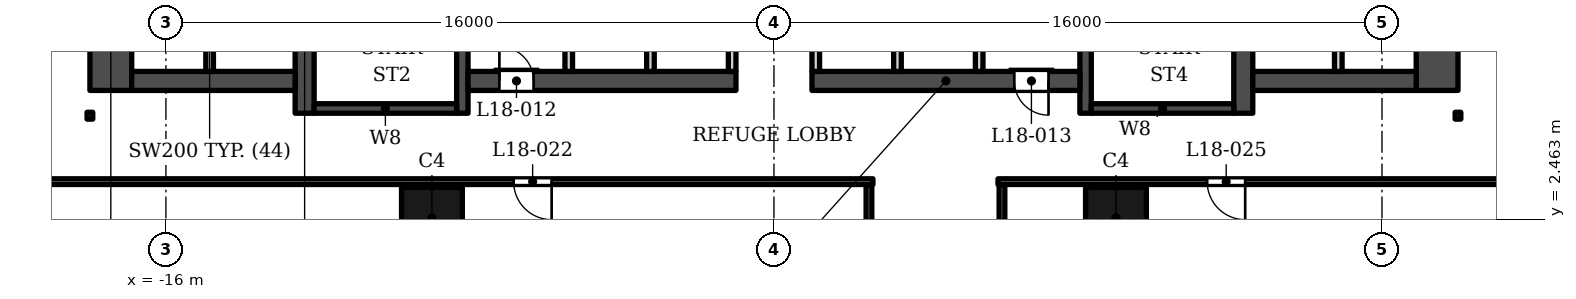
"""IFC4 building model, lengths in metres.
Left out: names, types, materials, properties, quantities, classifications, styles, units other than length and angle.
Written with IfcOpenShell. Run it as: python <this file> out.ifc"""

import sys

from ifc_helpers import new_model, si_unit, direction, frame, frame_2d, origin, origin_2d, place, context, subcontext, project, spatial, rectangle, extrude, element, fill, save


model = new_model("IFC4")
c1 = context("Model", 3, precision=1e-05, world=origin(), true_north=direction((0.0, 1.0)))
c2 = subcontext(c1, "Body", "Model", "MODEL_VIEW")
j1 = project(units=[si_unit("LENGTHUNIT", "METRE"), si_unit("PLANEANGLEUNIT", "RADIAN")], contexts=[c1])
p1 = place(None, origin())
s1 = spatial("IfcSite", under=j1, at=p1, CompositionType="ELEMENT")
p2 = place(p1, origin())
s2 = spatial("IfcBuilding", under=s1, at=p2, CompositionType="ELEMENT")
p3 = place(p2, frame((0.0, 0.0, 86.8)))
s3 = spatial("IfcBuildingStorey", under=s2, at=p3, CompositionType="ELEMENT", Elevation=86.8)
p4 = place(p3, frame((-12.35, 5.253, 0.0), z_axis=(0.0, 0.0, 1.0), x_axis=(0.0, 1.0, 0.0)))
e1 = element("IfcWall", 1, at=p4, inside=s3, PredefinedType="SHEAR", context=c2, shape_type="SweptSolid", body=[
    extrude(rectangle(XDim=13.3, YDim=0.5, at=frame_2d((6.65, 0.0))), origin(), (0.0, 0.0, 1.0), 5.0),
])
p5 = place(p3, frame((-8.2, 5.253, 0.0), z_axis=(0.0, 0.0, 1.0), x_axis=(0.0, 1.0, 0.0)))
e2 = element("IfcWall", 2, at=p5, inside=s3, PredefinedType="SHEAR", context=c2, shape_type="SweptSolid", body=[
    extrude(rectangle(XDim=13.3, YDim=0.3, at=frame_2d((6.65, 0.0))), origin(), (0.0, 0.0, 1.0), 5.0),
])
p6 = place(p5, frame((7.1, 0.0, 0.0)))
e3 = element("IfcOpeningElement", 3, at=p6, cuts=e2, PredefinedType="OPENING", context=c2, shape_type="SweptSolid", body=[
    extrude(rectangle(XDim=1.4, YDim=2.1, at=frame_2d((0.7, 1.05))), frame((0.0, 0.16, 0.0), z_axis=(0.0, -1.0, 0.0), x_axis=(1.0, 0.0, 0.0)), (0.0, 0.0, 1.0), 0.32),
])
p7 = place(p5, frame((5.05, 0.0, 0.0)))
e4 = element("IfcOpeningElement", 4, at=p7, cuts=e2, PredefinedType="OPENING", context=c2, shape_type="SweptSolid", body=[
    extrude(rectangle(XDim=1.4, YDim=2.1, at=frame_2d((0.7, 1.05))), frame((0.0, 0.16, 0.0), z_axis=(0.0, -1.0, 0.0), x_axis=(1.0, 0.0, 0.0)), (0.0, 0.0, 1.0), 0.32),
])
p8 = place(p3, frame((-12.1, 5.378, 0.0), z_axis=(0.0, 0.0, 1.0), x_axis=(1.0, 0.0, 0.0)))
e5 = element("IfcWall", 5, at=p8, inside=s3, PredefinedType="SHEAR", context=c2, shape_type="SweptSolid", body=[
    extrude(rectangle(XDim=3.75, YDim=0.25, at=frame_2d((1.875, 0.0))), origin(), (0.0, 0.0, 1.0), 5.0),
])
p9 = place(p3, frame((12.35, 5.253, 0.0), z_axis=(0.0, 0.0, 1.0), x_axis=(0.0, 1.0, 0.0)))
e6 = element("IfcWall", 6, at=p9, inside=s3, PredefinedType="SHEAR", context=c2, shape_type="SweptSolid", body=[
    extrude(rectangle(XDim=13.3, YDim=0.5, at=frame_2d((6.65, 0.0))), origin(), (0.0, 0.0, 1.0), 5.0),
])
p10 = place(p3, frame((8.2, 5.253, 0.0), z_axis=(0.0, 0.0, 1.0), x_axis=(0.0, 1.0, 0.0)))
e7 = element("IfcWall", 7, at=p10, inside=s3, PredefinedType="SHEAR", context=c2, shape_type="SweptSolid", body=[
    extrude(rectangle(XDim=13.3, YDim=0.3, at=frame_2d((6.65, 0.0))), origin(), (0.0, 0.0, 1.0), 5.0),
])
p11 = place(p10, frame((7.1, 0.0, 0.0)))
e8 = element("IfcOpeningElement", 8, at=p11, cuts=e7, PredefinedType="OPENING", context=c2, shape_type="SweptSolid", body=[
    extrude(rectangle(XDim=1.4, YDim=2.1, at=frame_2d((0.7, 1.05))), frame((0.0, 0.16, 0.0), z_axis=(0.0, -1.0, 0.0), x_axis=(1.0, 0.0, 0.0)), (0.0, 0.0, 1.0), 0.32),
])
p12 = place(p10, frame((5.05, 0.0, 0.0)))
e9 = element("IfcOpeningElement", 9, at=p12, cuts=e7, PredefinedType="OPENING", context=c2, shape_type="SweptSolid", body=[
    extrude(rectangle(XDim=1.4, YDim=2.1, at=frame_2d((0.7, 1.05))), frame((0.0, 0.16, 0.0), z_axis=(0.0, -1.0, 0.0), x_axis=(1.0, 0.0, 0.0)), (0.0, 0.0, 1.0), 0.32),
])
p13 = place(p3, frame((8.35, 5.378, 0.0), z_axis=(0.0, 0.0, 1.0), x_axis=(1.0, 0.0, 0.0)))
e10 = element("IfcWall", 10, at=p13, inside=s3, PredefinedType="SHEAR", context=c2, shape_type="SweptSolid", body=[
    extrude(rectangle(XDim=3.75, YDim=0.25, at=frame_2d((1.875, 0.0))), origin(), (0.0, 0.0, 1.0), 5.0),
])
p14 = place(p3, frame((-8.05, 6.103, 0.0), z_axis=(0.0, 0.0, 1.0), x_axis=(1.0, 0.0, 0.0)))
e11 = element("IfcWall", 11, at=p14, inside=s3, PredefinedType="SHEAR", context=c2, shape_type="SweptSolid", body=[
    extrude(rectangle(XDim=7.05, YDim=0.5, at=frame_2d((3.525, 0.0))), origin(), (0.0, 0.0, 1.0), 5.0),
])
p15 = place(p14, frame((0.825, 0.0, 0.0)))
e12 = element("IfcOpeningElement", 12, at=p15, cuts=e11, PredefinedType="OPENING", context=c2, shape_type="SweptSolid", body=[
    extrude(rectangle(XDim=0.9, YDim=2.1, at=frame_2d((0.45, 1.05))), frame((0.0, 0.26, 0.0), z_axis=(0.0, -1.0, 0.0), x_axis=(1.0, 0.0, 0.0)), (0.0, 0.0, 1.0), 0.52),
])
p16 = place(p3, frame((1.0, 6.103, 0.0), z_axis=(0.0, 0.0, 1.0), x_axis=(1.0, 0.0, 0.0)))
e13 = element("IfcWall", 13, at=p16, inside=s3, PredefinedType="SHEAR", context=c2, shape_type="SweptSolid", body=[
    extrude(rectangle(XDim=7.05, YDim=0.5, at=frame_2d((3.525, 0.0))), origin(), (0.0, 0.0, 1.0), 5.0),
])
p17 = place(p16, frame((5.325, 0.0, 0.0)))
e14 = element("IfcOpeningElement", 14, at=p17, cuts=e13, PredefinedType="OPENING", context=c2, shape_type="SweptSolid", body=[
    extrude(rectangle(XDim=0.9, YDim=2.1, at=frame_2d((0.45, 1.05))), frame((0.0, 0.26, 0.0), z_axis=(0.0, -1.0, 0.0), x_axis=(1.0, 0.0, 0.0)), (0.0, 0.0, 1.0), 0.52),
])
for number, where, z_axis, x_axis in (
    (15, (-12.6, 6.103, 0.0), (0.0, 0.0, 1.0), (-1.0, 0.0, 0.0)),
    (16, (12.6, 6.103, 0.0), (0.0, 0.0, 1.0), (1.0, 0.0, 0.0)),
):
    element("IfcWall", number, at=place(p3, frame(where, z_axis=z_axis, x_axis=x_axis)), inside=s3, PredefinedType="SHEAR", context=c2, shape_type="SweptSolid", body=[
        extrude(rectangle(XDim=4.3, YDim=0.5, at=frame_2d((2.15, 0.0))), origin(), (0.0, 0.0, 1.0), 5.0),
    ])
p18 = place(p3, frame((-17.45, 5.853, 0.0), z_axis=(0.0, 0.0, 1.0), x_axis=(0.0, 1.0, 0.0)))
e17 = element("IfcWall", 17, at=p18, inside=s3, PredefinedType="SHEAR", context=c2, shape_type="SweptSolid", body=[
    extrude(rectangle(XDim=13.2, YDim=1.1, at=frame_2d((6.6, 0.0))), origin(), (0.0, 0.0, 1.0), 5.0),
])
p19 = place(p18, frame((4.1, 0.0, 0.0)))
e18 = element("IfcOpeningElement", 18, at=p19, cuts=e17, PredefinedType="OPENING", context=c2, shape_type="SweptSolid", body=[
    extrude(rectangle(XDim=1.6, YDim=2.1, at=frame_2d((0.8, 1.05))), frame((0.0, 0.56, 0.0), z_axis=(0.0, -1.0, 0.0), x_axis=(1.0, 0.0, 0.0)), (0.0, 0.0, 1.0), 1.12),
])
p20 = place(p18, frame((11.397, 0.0, 0.0)))
e19 = element("IfcOpeningElement", 19, at=p20, cuts=e17, PredefinedType="OPENING", context=c2, shape_type="SweptSolid", body=[
    extrude(rectangle(XDim=0.9, YDim=2.1, at=frame_2d((0.45, 1.05))), frame((0.0, 0.56, 0.0), z_axis=(0.0, -1.0, 0.0), x_axis=(1.0, 0.0, 0.0)), (0.0, 0.0, 1.0), 1.12),
])
p21 = place(p3, frame((17.45, 5.853, 0.0), z_axis=(0.0, 0.0, 1.0), x_axis=(0.0, 1.0, 0.0)))
e20 = element("IfcWall", 20, at=p21, inside=s3, PredefinedType="SHEAR", context=c2, shape_type="SweptSolid", body=[
    extrude(rectangle(XDim=13.2, YDim=1.1, at=frame_2d((6.6, 0.0))), origin(), (0.0, 0.0, 1.0), 5.0),
])
p22 = place(p21, frame((4.1, 0.0, 0.0)))
e21 = element("IfcOpeningElement", 21, at=p22, cuts=e20, PredefinedType="OPENING", context=c2, shape_type="SweptSolid", body=[
    extrude(rectangle(XDim=1.6, YDim=2.1, at=frame_2d((0.8, 1.05))), frame((0.0, 0.56, 0.0), z_axis=(0.0, -1.0, 0.0), x_axis=(1.0, 0.0, 0.0)), (0.0, 0.0, 1.0), 1.12),
])
p23 = place(p21, frame((11.397, 0.0, 0.0)))
e22 = element("IfcOpeningElement", 22, at=p23, cuts=e20, PredefinedType="OPENING", context=c2, shape_type="SweptSolid", body=[
    extrude(rectangle(XDim=0.9, YDim=2.1, at=frame_2d((0.45, 1.05))), frame((0.0, 0.56, 0.0), z_axis=(0.0, -1.0, 0.0), x_axis=(1.0, 0.0, 0.0)), (0.0, 0.0, 1.0), 1.12),
])
for number, where, z_axis, x_axis in (
    (23, (-9.0, 2.5, 0.0), (0.0, 0.0, 1.0), (1.0, 0.0, 0.0)),
    (24, (9.0, 2.5, 0.0), (0.0, 0.0, 1.0), (1.0, 0.0, 0.0)),
):
    element("IfcColumn", number, at=place(p3, frame(where, z_axis=z_axis, x_axis=x_axis)), inside=s3, PredefinedType="COLUMN", context=c2, shape_type="SweptSolid", body=[
        extrude(rectangle(XDim=1.6, YDim=1.6, at=origin_2d()), origin(), (0.0, 0.0, 1.0), 5.0),
    ])
for number, where, z_axis, x_axis in (
    (25, (-14.85, 6.353, 0.0), (0.0, 0.0, 1.0), (0.0, 1.0, 0.0)),
    (26, (-5.4, 6.353, 0.0), (0.0, 0.0, 1.0), (0.0, 1.0, 0.0)),
    (27, (-3.25, 6.353, 0.0), (0.0, 0.0, 1.0), (0.0, 1.0, 0.0)),
    (28, (-1.1, 6.353, 0.0), (0.0, 0.0, 1.0), (0.0, 1.0, 0.0)),
    (29, (1.1, 6.353, 0.0), (0.0, 0.0, 1.0), (0.0, 1.0, 0.0)),
    (30, (3.25, 6.353, 0.0), (0.0, 0.0, 1.0), (0.0, 1.0, 0.0)),
    (31, (5.4, 6.353, 0.0), (0.0, 0.0, 1.0), (0.0, 1.0, 0.0)),
    (32, (14.85, 6.353, 0.0), (0.0, 0.0, 1.0), (0.0, 1.0, 0.0)),
):
    element("IfcWall", number, at=place(p3, frame(where, z_axis=z_axis, x_axis=x_axis)), inside=s3, PredefinedType="SOLIDWALL", context=c2, shape_type="SweptSolid", body=[
        extrude(rectangle(XDim=2.5, YDim=0.2, at=frame_2d((1.25, 0.0))), origin(), (0.0, 0.0, 1.0), 4.83),
    ])
for number, where, z_axis, x_axis in (
    (33, (2.5, -11.472, 0.0), (0.0, 0.0, 1.0), (0.0, 1.0, 0.0)),
    (34, (6.0, -11.472, 0.0), (0.0, 0.0, 1.0), (0.0, 1.0, 0.0)),
):
    element("IfcWall", number, at=place(p3, frame(where, z_axis=z_axis, x_axis=x_axis)), inside=s3, PredefinedType="PARTITIONING", context=c2, shape_type="SweptSolid", body=[
        extrude(rectangle(XDim=14.85, YDim=0.15, at=frame_2d((7.425, 0.0))), origin(), (0.0, 0.0, 1.0), 4.83),
    ])
p24 = place(p3, frame((-22.223, 3.453, 0.0), z_axis=(0.0, 0.0, 1.0), x_axis=(1.0, 0.0, 0.0)))
e35 = element("IfcWall", 35, at=p24, inside=s3, PredefinedType="PARTITIONING", context=c2, shape_type="SweptSolid", body=[
    extrude(rectangle(XDim=24.828, YDim=0.15, at=frame_2d((12.414, 0.0))), origin(), (0.0, 0.0, 1.0), 3.752),
])
p25 = place(p24, frame((15.374, 0.0, 0.0)))
e36 = element("IfcOpeningElement", 36, at=p25, cuts=e35, PredefinedType="OPENING", context=c2, shape_type="SweptSolid", body=[
    extrude(rectangle(XDim=1.0, YDim=2.1, at=frame_2d((0.5, 1.05))), frame((0.0, 0.085, 0.0), z_axis=(0.0, -1.0, 0.0), x_axis=(1.0, 0.0, 0.0)), (0.0, 0.0, 1.0), 0.17),
])
p26 = place(p3, frame((5.895, 3.453, 0.0), z_axis=(0.0, 0.0, 1.0), x_axis=(1.0, 0.0, 0.0)))
e37 = element("IfcWall", 37, at=p26, inside=s3, PredefinedType="PARTITIONING", context=c2, shape_type="SweptSolid", body=[
    extrude(rectangle(XDim=18.118, YDim=0.15, at=frame_2d((9.059, 0.0))), origin(), (0.0, 0.0, 1.0), 3.752),
])
p27 = place(p26, frame((5.505, 0.0, 0.0)))
e38 = element("IfcOpeningElement", 38, at=p27, cuts=e37, PredefinedType="OPENING", context=c2, shape_type="SweptSolid", body=[
    extrude(rectangle(XDim=1.0, YDim=2.1, at=frame_2d((0.5, 1.05))), frame((0.0, 0.085, 0.0), z_axis=(0.0, -1.0, 0.0), x_axis=(1.0, 0.0, 0.0)), (0.0, 0.0, 1.0), 0.17),
])
p28 = place(p3, frame((-18.0, 5.098, 0.0), z_axis=(0.0, 0.0, 1.0), x_axis=(0.0, 1.0, 0.0)))
e39 = element("IfcWall", 39, at=p28, inside=s3, PredefinedType="PARTITIONING", context=c2, shape_type="SweptSolid", body=[
    extrude(rectangle(XDim=0.18, YDim=0.15, at=frame_2d((0.09, 0.0))), origin(), (0.0, 0.0, 1.0), 4.83),
])
p29 = place(p3, frame((18.0, 5.098, 0.0), z_axis=(0.0, 0.0, 1.0), x_axis=(0.0, 1.0, 0.0)))
e40 = element("IfcWall", 40, at=p29, inside=s3, PredefinedType="PARTITIONING", context=c2, shape_type="SweptSolid", body=[
    extrude(rectangle(XDim=0.18, YDim=0.15, at=frame_2d((0.09, 0.0))), origin(), (0.0, 0.0, 1.0), 4.05),
])
p30 = place(p15, origin())
e41 = element("IfcDoor", 41, at=p30, inside=s3, OperationType="SINGLE_SWING_LEFT", PredefinedType="DOOR", context=c2, shape_type="SweptSolid", body=[
    extrude(rectangle(XDim=0.9, YDim=2.1, at=frame_2d((0.45, 1.05))), frame((0.0, 0.025, 0.0), z_axis=(0.0, -1.0, 0.0), x_axis=(1.0, 0.0, 0.0)), (0.0, 0.0, 1.0), 0.05),
])
fill(e12, e41)
p31 = place(p17, origin())
e42 = element("IfcDoor", 42, at=p31, inside=s3, OperationType="SINGLE_SWING_RIGHT", PredefinedType="DOOR", context=c2, shape_type="SweptSolid", body=[
    extrude(rectangle(XDim=0.9, YDim=2.1, at=frame_2d((0.45, 1.05))), frame((0.0, 0.025, 0.0), z_axis=(0.0, -1.0, 0.0), x_axis=(1.0, 0.0, 0.0)), (0.0, 0.0, 1.0), 0.05),
])
fill(e14, e42)
p32 = place(p25, origin())
e43 = element("IfcDoor", 43, at=p32, inside=s3, OperationType="SINGLE_SWING_RIGHT", PredefinedType="DOOR", context=c2, shape_type="SweptSolid", body=[
    extrude(rectangle(XDim=1.0, YDim=2.1, at=frame_2d((0.5, 1.05))), frame((0.0, 0.025, 0.0), z_axis=(0.0, -1.0, 0.0), x_axis=(1.0, 0.0, 0.0)), (0.0, 0.0, 1.0), 0.05),
])
fill(e36, e43)
p33 = place(p27, origin())
e44 = element("IfcDoor", 44, at=p33, inside=s3, OperationType="SINGLE_SWING_RIGHT", PredefinedType="DOOR", context=c2, shape_type="SweptSolid", body=[
    extrude(rectangle(XDim=1.0, YDim=2.1, at=frame_2d((0.5, 1.05))), frame((0.0, 0.025, 0.0), z_axis=(0.0, -1.0, 0.0), x_axis=(1.0, 0.0, 0.0)), (0.0, 0.0, 1.0), 0.05),
])
fill(e38, e44)
save(model, sys.argv[1])
